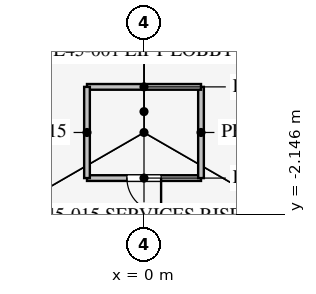
"""IFC4 building model, lengths in metres.
Left out: names, types, materials, properties, quantities, classifications, styles, units other than length and angle.
Written with IfcOpenShell. Run it as: python <this file> out.ifc"""

import sys

from ifc_helpers import new_model, si_unit, direction, frame, frame_2d, origin, place, context, subcontext, project, spatial, rectangle, extrude, element, fill, save


model = new_model("IFC4")
c1 = context("Model", 3, precision=1e-05, world=origin(), true_north=direction((0.0, 1.0)))
c2 = subcontext(c1, "Body", "Model", "MODEL_VIEW")
j1 = project(units=[si_unit("LENGTHUNIT", "METRE"), si_unit("PLANEANGLEUNIT", "RADIAN")], contexts=[c1])
p1 = place(None, origin())
s1 = spatial("IfcSite", under=j1, at=p1, CompositionType="ELEMENT")
p2 = place(p1, origin())
s2 = spatial("IfcBuilding", under=s1, at=p2, CompositionType="ELEMENT")
p3 = place(p2, frame((0.0, 0.0, 198.1)))
s3 = spatial("IfcBuildingStorey", under=s2, at=p3, CompositionType="ELEMENT", Elevation=198.1)
p4 = place(p3, frame((-1.5, -1.2, 0.0), z_axis=(0.0, 0.0, 1.0), x_axis=(1.0, 0.0, 0.0)))
e1 = element("IfcWall", 1, at=p4, inside=s3, PredefinedType="PARTITIONING", context=c2, shape_type="SweptSolid", body=[
    extrude(rectangle(XDim=3.0, YDim=0.15, at=frame_2d((1.5, 0.0))), origin(), (0.0, 0.0, 1.0), 4.0),
])
p5 = place(p4, frame((1.05, 0.0, 0.0)))
e2 = element("IfcOpeningElement", 2, at=p5, cuts=e1, PredefinedType="OPENING", context=c2, shape_type="SweptSolid", body=[
    extrude(rectangle(XDim=0.9, YDim=2.1, at=frame_2d((0.45, 1.05))), frame((0.0, 0.085, 0.0), z_axis=(0.0, -1.0, 0.0), x_axis=(1.0, 0.0, 0.0)), (0.0, 0.0, 1.0), 0.17),
])
p6 = place(p3, frame((1.5, -1.2, 0.0), z_axis=(0.0, 0.0, 1.0), x_axis=(0.0, 1.0, 0.0)))
e3 = element("IfcWall", 3, at=p6, inside=s3, PredefinedType="PARTITIONING", context=c2, shape_type="SweptSolid", body=[
    extrude(rectangle(XDim=2.4, YDim=0.15, at=frame_2d((1.2, 0.0))), origin(), (0.0, 0.0, 1.0), 4.0),
])
p7 = place(p3, frame((1.5, 1.2, 0.0), z_axis=(0.0, 0.0, 1.0), x_axis=(-1.0, 0.0, 0.0)))
e4 = element("IfcWall", 4, at=p7, inside=s3, PredefinedType="PARTITIONING", context=c2, shape_type="SweptSolid", body=[
    extrude(rectangle(XDim=3.0, YDim=0.15, at=frame_2d((1.5, 0.0))), origin(), (0.0, 0.0, 1.0), 4.0),
])
p8 = place(p3, frame((-1.5, 1.2, 0.0), z_axis=(0.0, 0.0, 1.0), x_axis=(0.0, -1.0, 0.0)))
e5 = element("IfcWall", 5, at=p8, inside=s3, PredefinedType="PARTITIONING", context=c2, shape_type="SweptSolid", body=[
    extrude(rectangle(XDim=2.4, YDim=0.15, at=frame_2d((1.2, 0.0))), origin(), (0.0, 0.0, 1.0), 4.0),
])
p9 = place(p3, frame((26.415, -15.231, 0.0), z_axis=(0.0, 0.0, 1.0), x_axis=(-0.50000091641, 0.866024874695, 0.0)))
e6 = element("IfcWall", 6, at=p9, inside=s3, PredefinedType="PARTITIONING", context=c2, shape_type="SweptSolid", body=[
    extrude(rectangle(XDim=52.796, YDim=0.12, at=frame_2d((26.398, 0.0))), origin(), (0.0, 0.0, 1.0), 2.9),
])
p10 = place(p9, frame((10.2, 0.0, 0.15)))
e7 = element("IfcOpeningElement", 7, at=p10, cuts=e6, PredefinedType="OPENING", context=c2, shape_type="SweptSolid", body=[
    extrude(rectangle(XDim=1.8, YDim=2.1, at=frame_2d((0.9, 1.05))), frame((0.0, 0.07, 0.0), z_axis=(0.0, -1.0, 0.0), x_axis=(1.0, 0.0, 0.0)), (0.0, 0.0, 1.0), 0.14),
])
p11 = place(p9, frame((40.8, 0.0, 0.15)))
e8 = element("IfcOpeningElement", 8, at=p11, cuts=e6, PredefinedType="OPENING", context=c2, shape_type="SweptSolid", body=[
    extrude(rectangle(XDim=1.8, YDim=2.1, at=frame_2d((0.9, 1.05))), frame((0.0, 0.07, 0.0), z_axis=(0.0, -1.0, 0.0), x_axis=(1.0, 0.0, 0.0)), (0.0, 0.0, 1.0), 0.14),
])
p12 = place(p5, frame((0.9, 0.0, 0.0), z_axis=(0.0, 0.0, 1.0), x_axis=(-1.0, 0.0, 0.0)))
e9 = element("IfcDoor", 9, at=p12, inside=s3, OperationType="SINGLE_SWING_LEFT", PredefinedType="DOOR", context=c2, shape_type="SweptSolid", body=[
    extrude(rectangle(XDim=0.9, YDim=2.1, at=frame_2d((0.45, 1.05))), frame((0.0, 0.025, 0.0), z_axis=(0.0, -1.0, 0.0), x_axis=(1.0, 0.0, 0.0)), (0.0, 0.0, 1.0), 0.05),
])
fill(e2, e9)
save(model, sys.argv[1])
